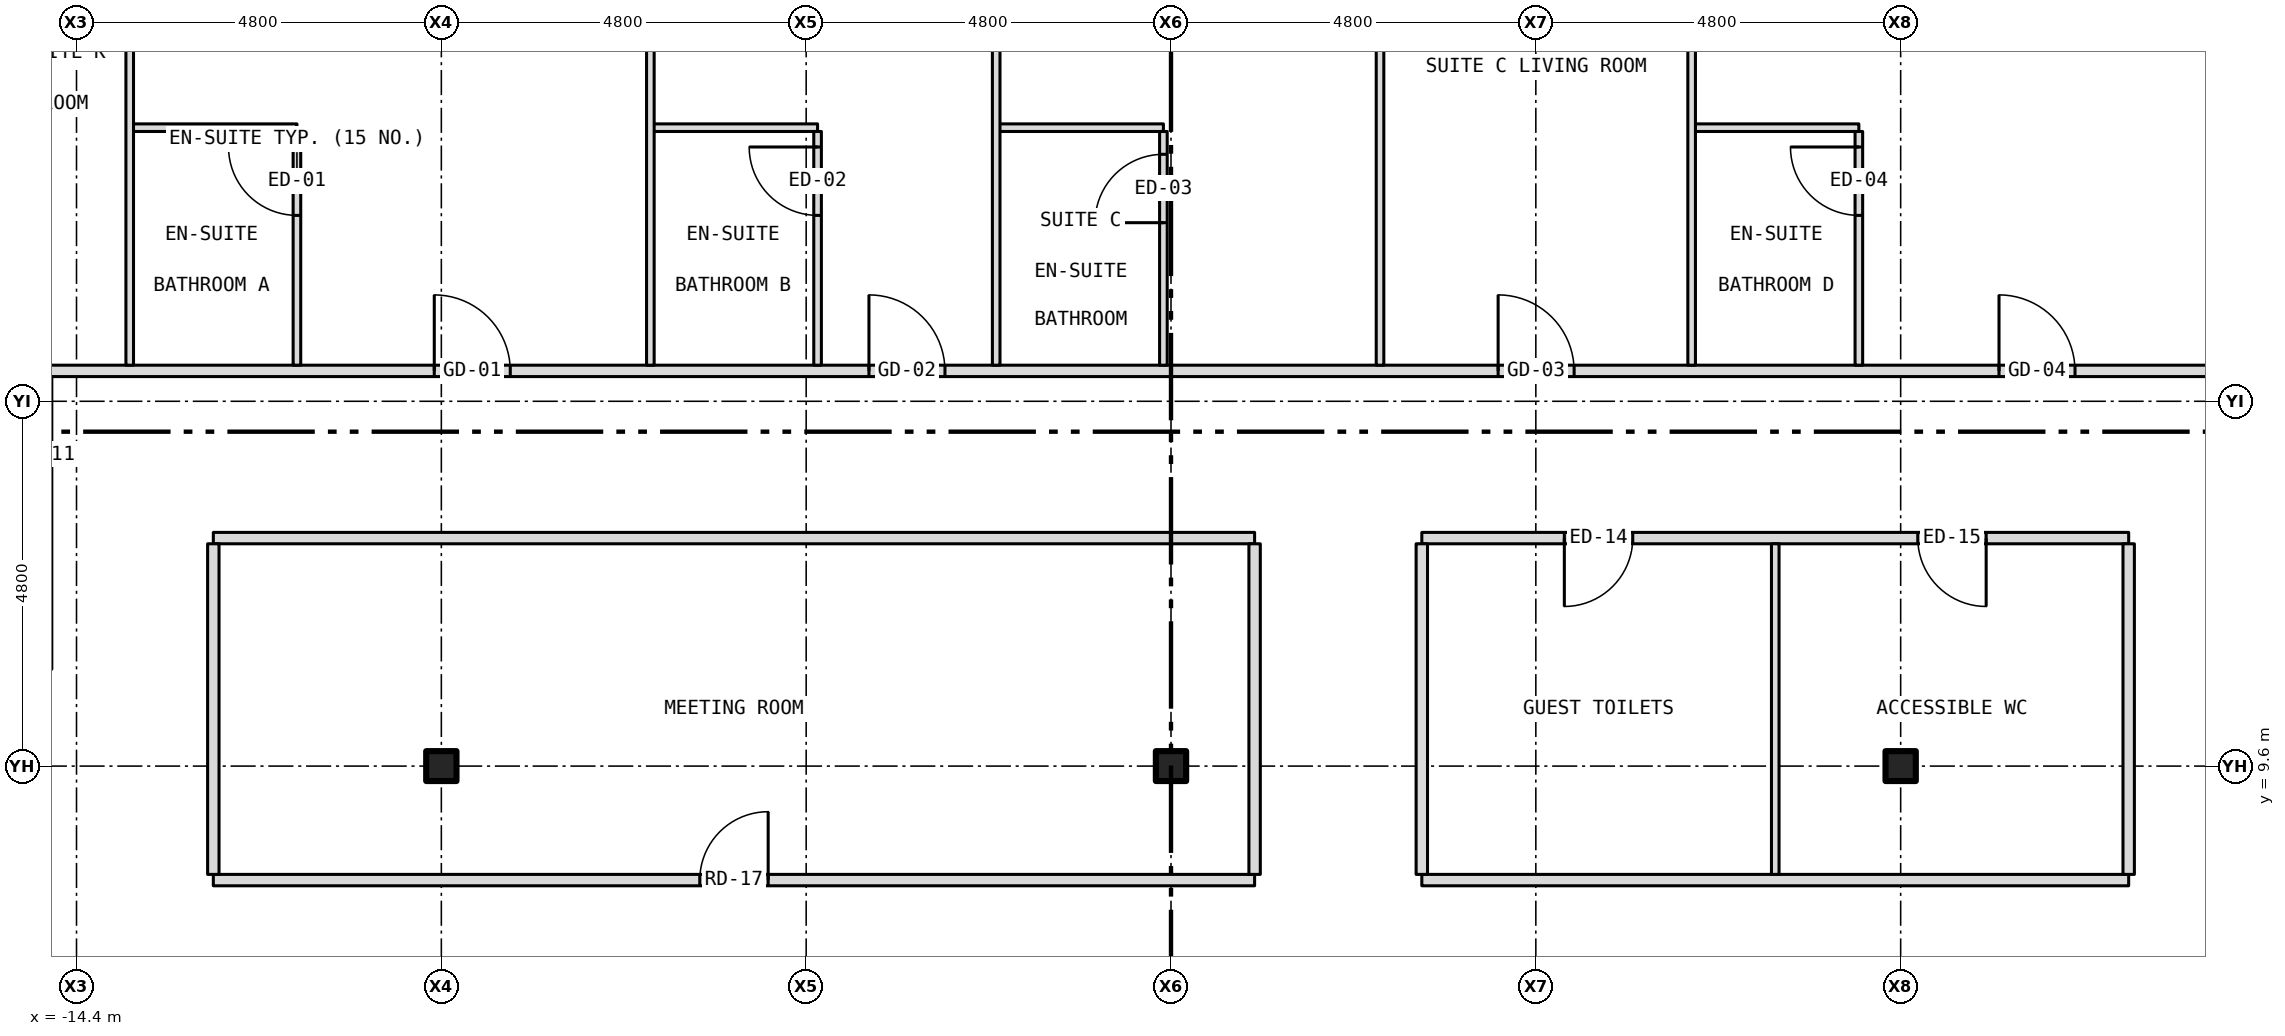
"""IFC4 building model, lengths in metres.
Left out: names, types, materials, properties, quantities, classifications, styles, units other than length and angle.
Written with IfcOpenShell. Run it as: python <this file> out.ifc"""

import sys

from ifc_helpers import new_model, si_unit, direction, frame, frame_2d, origin, origin_2d, place, context, subcontext, project, spatial, rectangle, i_section, extrude, element, fill, save


model = new_model("IFC4")
c1 = context("Model", 3, precision=1e-05, world=origin(), true_north=direction((0.0, 1.0)))
c2 = subcontext(c1, "Body", "Model", "MODEL_VIEW")
j1 = project(units=[si_unit("LENGTHUNIT", "METRE"), si_unit("PLANEANGLEUNIT", "RADIAN")], contexts=[c1])
p1 = place(None, origin())
s1 = spatial("IfcSite", under=j1, at=p1, CompositionType="ELEMENT")
p2 = place(p1, origin())
s2 = spatial("IfcBuilding", under=s1, at=p2, CompositionType="ELEMENT")
p3 = place(p2, frame((0.0, 0.0, 89.0)))
s3 = spatial("IfcBuildingStorey", under=s2, at=p3, CompositionType="ELEMENT", Elevation=89.0)
for number, where, z_axis, x_axis in (
    (1, (-9.6, 9.6, -0.15), (0.0, 0.0, 1.0), (1.0, 0.0, 0.0)),
    (2, (0.0, 9.6, -0.15), (0.0, 0.0, 1.0), (1.0, 0.0, 0.0)),
    (3, (9.6, 9.6, -0.15), (0.0, 0.0, 1.0), (1.0, 0.0, 0.0)),
):
    element("IfcColumn", number, at=place(p3, frame(where, z_axis=z_axis, x_axis=x_axis)), inside=s3, PredefinedType="COLUMN", context=c2, shape_type="SweptSolid", body=[
        extrude(i_section(OverallWidth=0.399, OverallDepth=0.394, WebThickness=0.023, FlangeThickness=0.037, at=origin_2d()), origin(), (0.0, 0.0, 1.0), 3.5),
    ])
p4 = place(p3, frame((-12.6, 8.1, 0.0), z_axis=(0.0, 0.0, 1.0), x_axis=(1.0, 0.0, 0.0)))
e4 = element("IfcWall", 4, at=p4, inside=s3, PredefinedType="PARTITIONING", context=c2, shape_type="SweptSolid", body=[
    extrude(rectangle(XDim=13.7, YDim=0.15, at=frame_2d((6.85, 0.0))), origin(), (0.0, 0.0, 1.0), 3.35),
])
p5 = place(p4, frame((6.4, 0.0, 0.0)))
e5 = element("IfcOpeningElement", 5, at=p5, cuts=e4, PredefinedType="OPENING", context=c2, shape_type="SweptSolid", body=[
    extrude(rectangle(XDim=0.9, YDim=2.1, at=frame_2d((0.45, 1.05))), frame((0.0, 0.087, 0.0), z_axis=(0.0, -1.0, 0.0), x_axis=(1.0, 0.0, 0.0)), (0.0, 0.0, 1.0), 0.174),
])
p6 = place(p3, frame((3.3, 8.1, 0.0), z_axis=(0.0, 0.0, 1.0), x_axis=(1.0, 0.0, 0.0)))
e6 = element("IfcWall", 6, at=p6, inside=s3, PredefinedType="PARTITIONING", context=c2, shape_type="SweptSolid", body=[
    extrude(rectangle(XDim=9.3, YDim=0.15, at=frame_2d((4.65, 0.0))), origin(), (0.0, 0.0, 1.0), 3.35),
])
p7 = place(p3, frame((-12.6, 12.6, 0.0), z_axis=(0.0, 0.0, 1.0), x_axis=(1.0, 0.0, 0.0)))
e7 = element("IfcWall", 7, at=p7, inside=s3, PredefinedType="PARTITIONING", context=c2, shape_type="SweptSolid", body=[
    extrude(rectangle(XDim=13.7, YDim=0.15, at=frame_2d((6.85, 0.0))), origin(), (0.0, 0.0, 1.0), 3.35),
])
p8 = place(p3, frame((3.3, 12.6, 0.0), z_axis=(0.0, 0.0, 1.0), x_axis=(1.0, 0.0, 0.0)))
e8 = element("IfcWall", 8, at=p8, inside=s3, PredefinedType="PARTITIONING", context=c2, shape_type="SweptSolid", body=[
    extrude(rectangle(XDim=9.3, YDim=0.15, at=frame_2d((4.65, 0.0))), origin(), (0.0, 0.0, 1.0), 3.35),
])
p9 = place(p8, frame((1.875, 0.0, 0.0)))
e9 = element("IfcOpeningElement", 9, at=p9, cuts=e8, PredefinedType="OPENING", context=c2, shape_type="SweptSolid", body=[
    extrude(rectangle(XDim=0.9, YDim=2.1, at=frame_2d((0.45, 1.05))), frame((0.0, 0.087, 0.0), z_axis=(0.0, -1.0, 0.0), x_axis=(1.0, 0.0, 0.0)), (0.0, 0.0, 1.0), 0.174),
])
p10 = place(p8, frame((6.525, 0.0, 0.0)))
e10 = element("IfcOpeningElement", 10, at=p10, cuts=e8, PredefinedType="OPENING", context=c2, shape_type="SweptSolid", body=[
    extrude(rectangle(XDim=0.9, YDim=2.1, at=frame_2d((0.45, 1.05))), frame((0.0, 0.087, 0.0), z_axis=(0.0, -1.0, 0.0), x_axis=(1.0, 0.0, 0.0)), (0.0, 0.0, 1.0), 0.174),
])
p11 = place(p3, frame((-14.8, 14.8, 0.0), z_axis=(0.0, 0.0, 1.0), x_axis=(1.0, 0.0, 0.0)))
e11 = element("IfcWall", 11, at=p11, inside=s3, PredefinedType="PARTITIONING", context=c2, shape_type="SweptSolid", body=[
    extrude(rectangle(XDim=29.6, YDim=0.15, at=frame_2d((14.8, 0.0))), origin(), (0.0, 0.0, 1.0), 3.35),
])
p12 = place(p11, frame((5.107, 0.0, 0.0)))
e12 = element("IfcOpeningElement", 12, at=p12, cuts=e11, PredefinedType="OPENING", context=c2, shape_type="SweptSolid", body=[
    extrude(rectangle(XDim=1.0, YDim=2.1, at=frame_2d((0.5, 1.05))), frame((0.0, 0.087, 0.0), z_axis=(0.0, -1.0, 0.0), x_axis=(1.0, 0.0, 0.0)), (0.0, 0.0, 1.0), 0.174),
])
p13 = place(p11, frame((10.826, 0.0, 0.0)))
e13 = element("IfcOpeningElement", 13, at=p13, cuts=e11, PredefinedType="OPENING", context=c2, shape_type="SweptSolid", body=[
    extrude(rectangle(XDim=1.0, YDim=2.1, at=frame_2d((0.5, 1.05))), frame((0.0, 0.087, 0.0), z_axis=(0.0, -1.0, 0.0), x_axis=(1.0, 0.0, 0.0)), (0.0, 0.0, 1.0), 0.174),
])
p14 = place(p11, frame((19.104, 0.0, 0.0)))
e14 = element("IfcOpeningElement", 14, at=p14, cuts=e11, PredefinedType="OPENING", context=c2, shape_type="SweptSolid", body=[
    extrude(rectangle(XDim=1.0, YDim=2.1, at=frame_2d((0.5, 1.05))), frame((0.0, 0.087, 0.0), z_axis=(0.0, -1.0, 0.0), x_axis=(1.0, 0.0, 0.0)), (0.0, 0.0, 1.0), 0.174),
])
p15 = place(p11, frame((25.694, 0.0, 0.0)))
e15 = element("IfcOpeningElement", 15, at=p15, cuts=e11, PredefinedType="OPENING", context=c2, shape_type="SweptSolid", body=[
    extrude(rectangle(XDim=1.0, YDim=2.1, at=frame_2d((0.5, 1.05))), frame((0.0, 0.087, 0.0), z_axis=(0.0, -1.0, 0.0), x_axis=(1.0, 0.0, 0.0)), (0.0, 0.0, 1.0), 0.174),
])
p16 = place(p3, frame((-13.7, 18.0, 0.0), z_axis=(0.0, 0.0, 1.0), x_axis=(1.0, 0.0, 0.0)))
e16 = element("IfcWall", 16, at=p16, inside=s3, PredefinedType="PARTITIONING", context=c2, shape_type="SweptSolid", body=[
    extrude(rectangle(XDim=2.2, YDim=0.1, at=frame_2d((1.1, 0.0))), origin(), (0.0, 0.0, 1.0), 3.35),
])
p17 = place(p3, frame((-6.85, 18.0, 0.0), z_axis=(0.0, 0.0, 1.0), x_axis=(1.0, 0.0, 0.0)))
e17 = element("IfcWall", 17, at=p17, inside=s3, PredefinedType="PARTITIONING", context=c2, shape_type="SweptSolid", body=[
    extrude(rectangle(XDim=2.2, YDim=0.1, at=frame_2d((1.1, 0.0))), origin(), (0.0, 0.0, 1.0), 3.35),
])
for number, where, z_axis, x_axis in (
    (18, (-2.3, 18.0, 0.0), (0.0, 0.0, 1.0), (1.0, 0.0, 0.0)),
    (19, (6.85, 18.0, 0.0), (0.0, 0.0, 1.0), (1.0, 0.0, 0.0)),
):
    element("IfcWall", number, at=place(p3, frame(where, z_axis=z_axis, x_axis=x_axis)), inside=s3, PredefinedType="PARTITIONING", context=c2, shape_type="SweptSolid", body=[
        extrude(rectangle(XDim=2.2, YDim=0.1, at=frame_2d((1.1, 0.0))), origin(), (0.0, 0.0, 1.0), 3.35),
    ])
p18 = place(p3, frame((-13.7, 14.875, 0.0), z_axis=(0.0, 0.0, 1.0), x_axis=(0.0, 1.0, 0.0)))
e20 = element("IfcWall", 20, at=p18, inside=s3, PredefinedType="PARTITIONING", context=c2, shape_type="SweptSolid", body=[
    extrude(rectangle(XDim=7.805, YDim=0.1, at=frame_2d((3.902, 0.0))), origin(), (0.0, 0.0, 1.0), 3.35),
])
p19 = place(p3, frame((-12.6, 8.175, 0.0), z_axis=(0.0, 0.0, 1.0), x_axis=(0.0, 1.0, 0.0)))
e21 = element("IfcWall", 21, at=p19, inside=s3, PredefinedType="PARTITIONING", context=c2, shape_type="SweptSolid", body=[
    extrude(rectangle(XDim=4.35, YDim=0.15, at=frame_2d((2.175, 0.0))), origin(), (0.0, 0.0, 1.0), 3.35),
])
p20 = place(p3, frame((-11.5, 14.875, 0.0), z_axis=(0.0, 0.0, 1.0), x_axis=(0.0, 1.0, 0.0)))
e22 = element("IfcWall", 22, at=p20, inside=s3, PredefinedType="PARTITIONING", context=c2, shape_type="SweptSolid", body=[
    extrude(rectangle(XDim=3.075, YDim=0.1, at=frame_2d((1.538, 0.0))), origin(), (0.0, 0.0, 1.0), 3.35),
])
p21 = place(p20, frame((1.971, 0.0, 0.0)))
e23 = element("IfcOpeningElement", 23, at=p21, cuts=e22, PredefinedType="OPENING", context=c2, shape_type="SweptSolid", body=[
    extrude(rectangle(XDim=0.9, YDim=2.1, at=frame_2d((0.45, 1.05))), frame((0.0, 0.062, 0.0), z_axis=(0.0, -1.0, 0.0), x_axis=(1.0, 0.0, 0.0)), (0.0, 0.0, 1.0), 0.124),
])
p22 = place(p3, frame((-6.85, 14.875, 0.0), z_axis=(0.0, 0.0, 1.0), x_axis=(0.0, 1.0, 0.0)))
e24 = element("IfcWall", 24, at=p22, inside=s3, PredefinedType="PARTITIONING", context=c2, shape_type="SweptSolid", body=[
    extrude(rectangle(XDim=8.405, YDim=0.1, at=frame_2d((4.203, 0.0))), origin(), (0.0, 0.0, 1.0), 3.35),
])
p23 = place(p3, frame((-4.65, 14.875, 0.0), z_axis=(0.0, 0.0, 1.0), x_axis=(0.0, 1.0, 0.0)))
e25 = element("IfcWall", 25, at=p23, inside=s3, PredefinedType="PARTITIONING", context=c2, shape_type="SweptSolid", body=[
    extrude(rectangle(XDim=3.075, YDim=0.1, at=frame_2d((1.538, 0.0))), origin(), (0.0, 0.0, 1.0), 2.817),
])
p24 = place(p23, frame((1.971, 0.0, 0.0)))
e26 = element("IfcOpeningElement", 26, at=p24, cuts=e25, PredefinedType="OPENING", context=c2, shape_type="SweptSolid", body=[
    extrude(rectangle(XDim=0.9, YDim=2.1, at=frame_2d((0.45, 1.05))), frame((0.0, 0.062, 0.0), z_axis=(0.0, -1.0, 0.0), x_axis=(1.0, 0.0, 0.0)), (0.0, 0.0, 1.0), 0.124),
])
p25 = place(p3, frame((-2.3, 14.875, 0.0), z_axis=(0.0, 0.0, 1.0), x_axis=(0.0, 1.0, 0.0)))
e27 = element("IfcWall", 27, at=p25, inside=s3, PredefinedType="PARTITIONING", context=c2, shape_type="SweptSolid", body=[
    extrude(rectangle(XDim=8.405, YDim=0.1, at=frame_2d((4.203, 0.0))), origin(), (0.0, 0.0, 1.0), 3.35),
])
p26 = place(p3, frame((-0.1, 14.875, 0.0), z_axis=(0.0, 0.0, 1.0), x_axis=(0.0, 1.0, 0.0)))
e28 = element("IfcWall", 28, at=p26, inside=s3, PredefinedType="PARTITIONING", context=c2, shape_type="SweptSolid", body=[
    extrude(rectangle(XDim=3.075, YDim=0.1, at=frame_2d((1.538, 0.0))), origin(), (0.0, 0.0, 1.0), 2.728),
])
p27 = place(p26, frame((1.875, 0.0, 0.0)))
e29 = element("IfcOpeningElement", 29, at=p27, cuts=e28, PredefinedType="OPENING", context=c2, shape_type="SweptSolid", body=[
    extrude(rectangle(XDim=0.9, YDim=2.1, at=frame_2d((0.45, 1.05))), frame((0.0, 0.062, 0.0), z_axis=(0.0, -1.0, 0.0), x_axis=(1.0, 0.0, 0.0)), (0.0, 0.0, 1.0), 0.124),
])
p28 = place(p3, frame((1.1, 8.175, 0.0), z_axis=(0.0, 0.0, 1.0), x_axis=(0.0, 1.0, 0.0)))
e30 = element("IfcWall", 30, at=p28, inside=s3, PredefinedType="PARTITIONING", context=c2, shape_type="SweptSolid", body=[
    extrude(rectangle(XDim=4.35, YDim=0.15, at=frame_2d((2.175, 0.0))), origin(), (0.0, 0.0, 1.0), 3.35),
])
p29 = place(p3, frame((2.75, 14.875, 0.0), z_axis=(0.0, 0.0, 1.0), x_axis=(0.0, 1.0, 0.0)))
e31 = element("IfcWall", 31, at=p29, inside=s3, PredefinedType="PARTITIONING", context=c2, shape_type="SweptSolid", body=[
    extrude(rectangle(XDim=8.405, YDim=0.1, at=frame_2d((4.203, 0.0))), origin(), (0.0, 0.0, 1.0), 3.35),
])
p30 = place(p29, frame((5.075, 0.0, 0.0)))
e32 = element("IfcOpeningElement", 32, at=p30, cuts=e31, PredefinedType="OPENING", context=c2, shape_type="SweptSolid", body=[
    extrude(rectangle(XDim=0.9, YDim=2.1, at=frame_2d((0.45, 1.05))), frame((0.0, 0.062, 0.0), z_axis=(0.0, -1.0, 0.0), x_axis=(1.0, 0.0, 0.0)), (0.0, 0.0, 1.0), 0.124),
])
p31 = place(p3, frame((3.3, 8.175, 0.0), z_axis=(0.0, 0.0, 1.0), x_axis=(0.0, 1.0, 0.0)))
e33 = element("IfcWall", 33, at=p31, inside=s3, PredefinedType="PARTITIONING", context=c2, shape_type="SweptSolid", body=[
    extrude(rectangle(XDim=4.35, YDim=0.15, at=frame_2d((2.175, 0.0))), origin(), (0.0, 0.0, 1.0), 3.35),
])
p32 = place(p3, frame((6.85, 14.875, 0.0), z_axis=(0.0, 0.0, 1.0), x_axis=(0.0, 1.0, 0.0)))
e34 = element("IfcWall", 34, at=p32, inside=s3, PredefinedType="PARTITIONING", context=c2, shape_type="SweptSolid", body=[
    extrude(rectangle(XDim=8.405, YDim=0.1, at=frame_2d((4.203, 0.0))), origin(), (0.0, 0.0, 1.0), 3.35),
])
p33 = place(p3, frame((7.95, 8.175, 0.0), z_axis=(0.0, 0.0, 1.0), x_axis=(0.0, 1.0, 0.0)))
e35 = element("IfcWall", 35, at=p33, inside=s3, PredefinedType="PARTITIONING", context=c2, shape_type="SweptSolid", body=[
    extrude(rectangle(XDim=4.35, YDim=0.1, at=frame_2d((2.175, 0.0))), origin(), (0.0, 0.0, 1.0), 3.35),
])
p34 = place(p3, frame((9.05, 14.875, 0.0), z_axis=(0.0, 0.0, 1.0), x_axis=(0.0, 1.0, 0.0)))
e36 = element("IfcWall", 36, at=p34, inside=s3, PredefinedType="PARTITIONING", context=c2, shape_type="SweptSolid", body=[
    extrude(rectangle(XDim=3.075, YDim=0.1, at=frame_2d((1.538, 0.0))), origin(), (0.0, 0.0, 1.0), 3.35),
])
p35 = place(p34, frame((1.971, 0.0, 0.0)))
e37 = element("IfcOpeningElement", 37, at=p35, cuts=e36, PredefinedType="OPENING", context=c2, shape_type="SweptSolid", body=[
    extrude(rectangle(XDim=0.9, YDim=2.1, at=frame_2d((0.45, 1.05))), frame((0.0, 0.062, 0.0), z_axis=(0.0, -1.0, 0.0), x_axis=(1.0, 0.0, 0.0)), (0.0, 0.0, 1.0), 0.124),
])
p36 = place(p3, frame((12.6, 8.175, 0.0), z_axis=(0.0, 0.0, 1.0), x_axis=(0.0, 1.0, 0.0)))
e38 = element("IfcWall", 38, at=p36, inside=s3, PredefinedType="PARTITIONING", context=c2, shape_type="SweptSolid", body=[
    extrude(rectangle(XDim=4.35, YDim=0.15, at=frame_2d((2.175, 0.0))), origin(), (0.0, 0.0, 1.0), 3.35),
])
p37 = place(p12, origin())
e39 = element("IfcDoor", 39, at=p37, inside=s3, OperationType="SINGLE_SWING_LEFT", PredefinedType="DOOR", context=c2, shape_type="SweptSolid", body=[
    extrude(rectangle(XDim=1.0, YDim=2.1, at=frame_2d((0.5, 1.05))), frame((0.0, 0.025, 0.0), z_axis=(0.0, -1.0, 0.0), x_axis=(1.0, 0.0, 0.0)), (0.0, 0.0, 1.0), 0.05),
])
fill(e12, e39)
p38 = place(p21, origin())
e40 = element("IfcDoor", 40, at=p38, inside=s3, OperationType="SINGLE_SWING_RIGHT", PredefinedType="DOOR", context=c2, shape_type="SweptSolid", body=[
    extrude(rectangle(XDim=0.9, YDim=2.1, at=frame_2d((0.45, 1.05))), frame((0.0, 0.025, 0.0), z_axis=(0.0, -1.0, 0.0), x_axis=(1.0, 0.0, 0.0)), (0.0, 0.0, 1.0), 0.05),
])
fill(e23, e40)
p39 = place(p13, origin())
e41 = element("IfcDoor", 41, at=p39, inside=s3, OperationType="SINGLE_SWING_LEFT", PredefinedType="DOOR", context=c2, shape_type="SweptSolid", body=[
    extrude(rectangle(XDim=1.0, YDim=2.1, at=frame_2d((0.5, 1.05))), frame((0.0, 0.025, 0.0), z_axis=(0.0, -1.0, 0.0), x_axis=(1.0, 0.0, 0.0)), (0.0, 0.0, 1.0), 0.05),
])
fill(e13, e41)
p40 = place(p24, origin())
e42 = element("IfcDoor", 42, at=p40, inside=s3, OperationType="SINGLE_SWING_RIGHT", PredefinedType="DOOR", context=c2, shape_type="SweptSolid", body=[
    extrude(rectangle(XDim=0.9, YDim=2.1, at=frame_2d((0.45, 1.05))), frame((0.0, 0.025, 0.0), z_axis=(0.0, -1.0, 0.0), x_axis=(1.0, 0.0, 0.0)), (0.0, 0.0, 1.0), 0.05),
])
fill(e26, e42)
p41 = place(p14, origin())
e43 = element("IfcDoor", 43, at=p41, inside=s3, OperationType="SINGLE_SWING_LEFT", PredefinedType="DOOR", context=c2, shape_type="SweptSolid", body=[
    extrude(rectangle(XDim=1.0, YDim=2.1, at=frame_2d((0.5, 1.05))), frame((0.0, 0.025, 0.0), z_axis=(0.0, -1.0, 0.0), x_axis=(1.0, 0.0, 0.0)), (0.0, 0.0, 1.0), 0.05),
])
fill(e14, e43)
p42 = place(p27, origin())
e44 = element("IfcDoor", 44, at=p42, inside=s3, OperationType="SINGLE_SWING_LEFT", PredefinedType="DOOR", context=c2, shape_type="SweptSolid", body=[
    extrude(rectangle(XDim=0.9, YDim=2.1, at=frame_2d((0.45, 1.05))), frame((0.0, 0.025, 0.0), z_axis=(0.0, -1.0, 0.0), x_axis=(1.0, 0.0, 0.0)), (0.0, 0.0, 1.0), 0.05),
])
fill(e29, e44)
p43 = place(p15, origin())
e45 = element("IfcDoor", 45, at=p43, inside=s3, OperationType="SINGLE_SWING_LEFT", PredefinedType="DOOR", context=c2, shape_type="SweptSolid", body=[
    extrude(rectangle(XDim=1.0, YDim=2.1, at=frame_2d((0.5, 1.05))), frame((0.0, 0.025, 0.0), z_axis=(0.0, -1.0, 0.0), x_axis=(1.0, 0.0, 0.0)), (0.0, 0.0, 1.0), 0.05),
])
fill(e15, e45)
p44 = place(p35, origin())
e46 = element("IfcDoor", 46, at=p44, inside=s3, OperationType="SINGLE_SWING_RIGHT", PredefinedType="DOOR", context=c2, shape_type="SweptSolid", body=[
    extrude(rectangle(XDim=0.9, YDim=2.1, at=frame_2d((0.45, 1.05))), frame((0.0, 0.025, 0.0), z_axis=(0.0, -1.0, 0.0), x_axis=(1.0, 0.0, 0.0)), (0.0, 0.0, 1.0), 0.05),
])
fill(e37, e46)
p45 = place(p9, origin())
e47 = element("IfcDoor", 47, at=p45, inside=s3, OperationType="SINGLE_SWING_LEFT", PredefinedType="DOOR", context=c2, shape_type="SweptSolid", body=[
    extrude(rectangle(XDim=0.9, YDim=2.1, at=frame_2d((0.45, 1.05))), frame((0.0, 0.025, 0.0), z_axis=(0.0, -1.0, 0.0), x_axis=(1.0, 0.0, 0.0)), (0.0, 0.0, 1.0), 0.05),
])
fill(e9, e47)
p46 = place(p10, origin())
e48 = element("IfcDoor", 48, at=p46, inside=s3, OperationType="SINGLE_SWING_RIGHT", PredefinedType="DOOR", context=c2, shape_type="SweptSolid", body=[
    extrude(rectangle(XDim=0.9, YDim=2.1, at=frame_2d((0.45, 1.05))), frame((0.0, 0.025, 0.0), z_axis=(0.0, -1.0, 0.0), x_axis=(1.0, 0.0, 0.0)), (0.0, 0.0, 1.0), 0.05),
])
fill(e10, e48)
p47 = place(p5, origin())
e49 = element("IfcDoor", 49, at=p47, inside=s3, OperationType="SINGLE_SWING_RIGHT", PredefinedType="DOOR", context=c2, shape_type="SweptSolid", body=[
    extrude(rectangle(XDim=0.9, YDim=2.1, at=frame_2d((0.45, 1.05))), frame((0.0, 0.025, 0.0), z_axis=(0.0, -1.0, 0.0), x_axis=(1.0, 0.0, 0.0)), (0.0, 0.0, 1.0), 0.05),
])
fill(e5, e49)
save(model, sys.argv[1])
